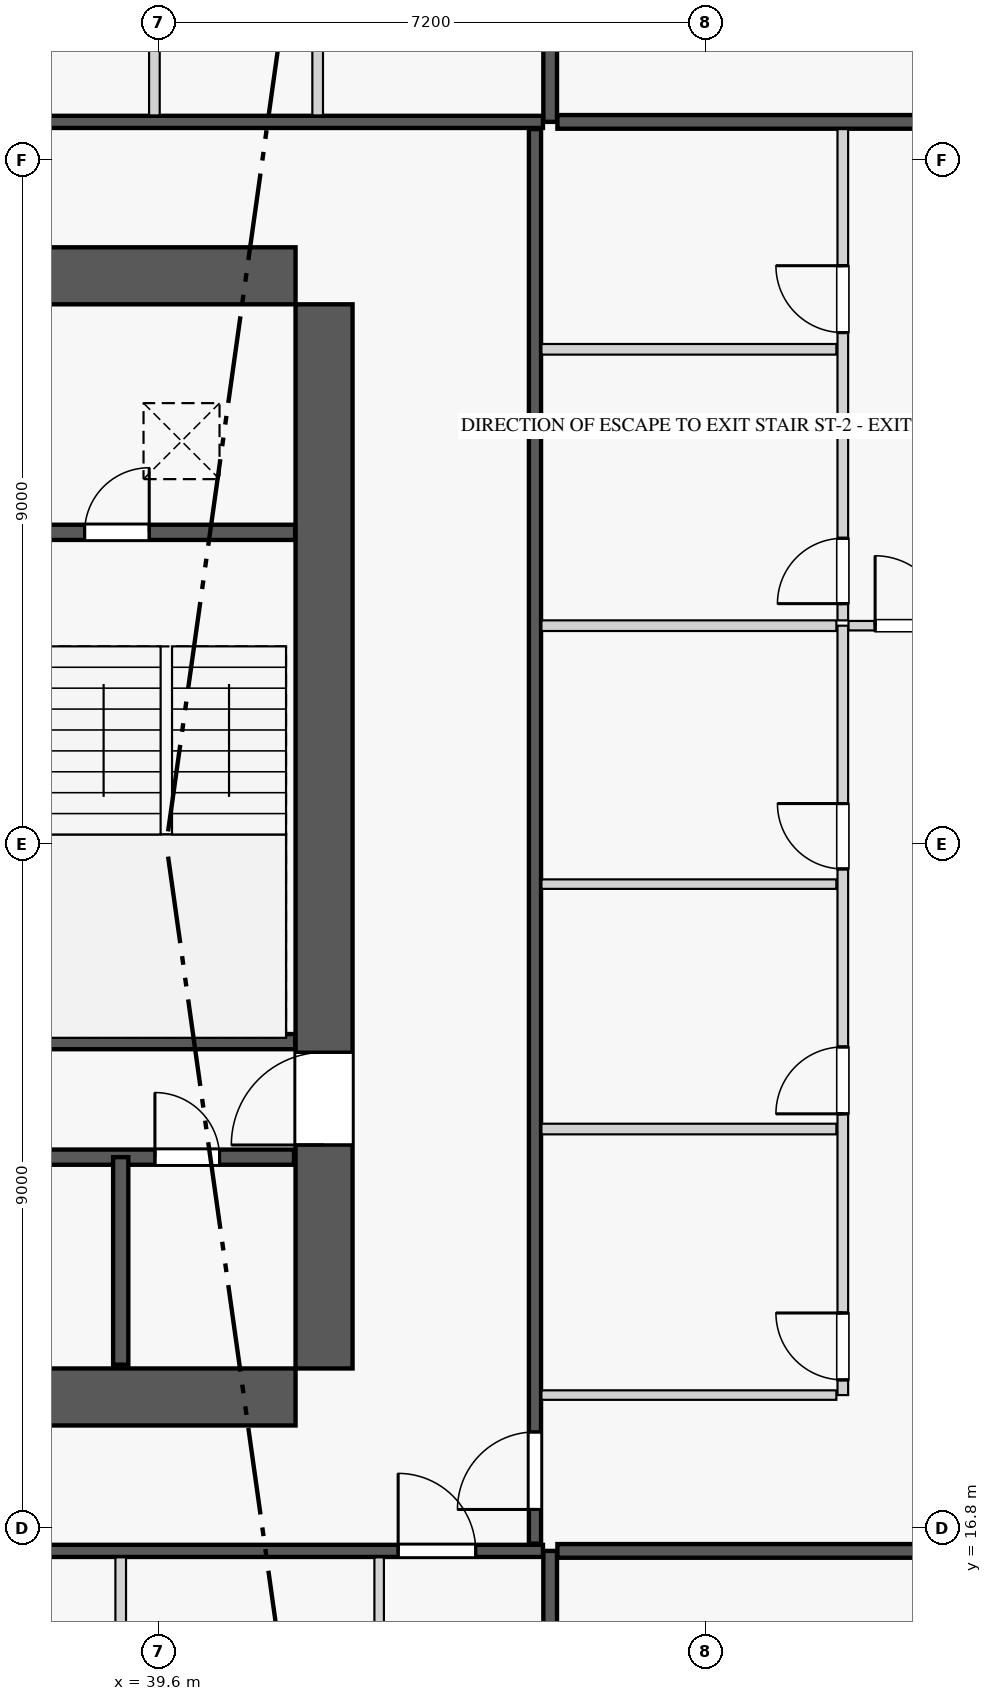
"""IFC4 building model, lengths in metres.
Left out: names, types, materials, properties, quantities, classifications, styles, units other than length and angle.
Written with IfcOpenShell. Run it as: python <this file> out.ifc"""

import sys

from ifc_helpers import new_model, si_unit, direction, frame, frame_2d, origin, origin_2d, place, context, subcontext, project, spatial, rectangle, extrude, element, fill, save


model = new_model("IFC4")
c1 = context("Model", 3, precision=1e-05, world=origin(), true_north=direction((0.0, 1.0)))
c2 = subcontext(c1, "Body", "Model", "MODEL_VIEW")
j1 = project(units=[si_unit("LENGTHUNIT", "METRE"), si_unit("PLANEANGLEUNIT", "RADIAN")], contexts=[c1])
p1 = place(None, origin())
s1 = spatial("IfcSite", under=j1, at=p1, CompositionType="ELEMENT")
p2 = place(p1, origin())
s2 = spatial("IfcBuilding", under=s1, at=p2, CompositionType="ELEMENT")
p3 = place(p2, frame((0.0, 0.0, 112.6)))
s3 = spatial("IfcBuildingStorey", under=s2, at=p3, CompositionType="ELEMENT", Elevation=112.6)
for number, where, z_axis, x_axis in (
    (1, (41.775, 18.525, 0.0), (0.0, 0.0, 1.0), (1.0, 0.0, 0.0)),
    (2, (41.775, 33.275, 0.0), (0.0, 0.0, 1.0), (1.0, 0.0, 0.0)),
):
    element("IfcColumn", number, at=place(p3, frame(where, z_axis=z_axis, x_axis=x_axis)), inside=s3, PredefinedType="COLUMN", context=c2, shape_type="SweptSolid", body=[
        extrude(rectangle(XDim=0.75, YDim=0.75, at=origin_2d()), origin(), (0.0, 0.0, 1.0), 3.55),
    ])
for number, where, z_axis, x_axis in (
    (3, (23.4, 18.525, 0.0), (0.0, 0.0, 1.0), (1.0, 0.0, 0.0)),
    (4, (23.4, 33.275, 0.0), (0.0, 0.0, 1.0), (1.0, 0.0, 0.0)),
):
    element("IfcWall", number, at=place(p3, frame(where, z_axis=z_axis, x_axis=x_axis)), inside=s3, PredefinedType="SHEAR", context=c2, shape_type="SweptSolid", body=[
        extrude(rectangle(XDim=18.0, YDim=0.75, at=frame_2d((9.0, 0.0))), origin(), (0.0, 0.0, 1.0), 3.34),
    ])
p4 = place(p3, frame((41.775, 18.9, 0.0), z_axis=(0.0, 0.0, 1.0), x_axis=(0.0, 1.0, 0.0)))
e5 = element("IfcWall", 5, at=p4, inside=s3, PredefinedType="SHEAR", context=c2, shape_type="SweptSolid", body=[
    extrude(rectangle(XDim=14.0, YDim=0.75, at=frame_2d((7.0, 0.0))), origin(), (0.0, 0.0, 1.0), 3.34),
])
p5 = place(p4, frame((2.94, 0.0, 0.0)))
e6 = element("IfcOpeningElement", 6, at=p5, cuts=e5, PredefinedType="OPENING", context=c2, shape_type="SweptSolid", body=[
    extrude(rectangle(XDim=1.22, YDim=2.25, at=frame_2d((0.61, 1.125))), frame((0.0, 0.385, 0.0), z_axis=(0.0, -1.0, 0.0), x_axis=(1.0, 0.0, 0.0)), (0.0, 0.0, 1.0), 0.77),
])
p6 = place(p3, frame((38.125, 23.2, 0.0), z_axis=(0.0, 0.0, 1.0), x_axis=(1.0, 0.0, 0.0)))
e7 = element("IfcWall", 7, at=p6, inside=s3, PredefinedType="PLUMBINGWALL", context=c2, shape_type="SweptSolid", body=[
    extrude(rectangle(XDim=3.27, YDim=0.2, at=frame_2d((1.635, 0.0))), origin(), (0.0, 0.0, 1.0), 3.34),
])
p7 = place(p3, frame((38.125, 29.9, 0.0), z_axis=(0.0, 0.0, 1.0), x_axis=(1.0, 0.0, 0.0)))
e8 = element("IfcWall", 8, at=p7, inside=s3, PredefinedType="PLUMBINGWALL", context=c2, shape_type="SweptSolid", body=[
    extrude(rectangle(XDim=3.27, YDim=0.2, at=frame_2d((1.635, 0.0))), origin(), (0.0, 0.0, 1.0), 3.34),
])
p8 = place(p7, frame((0.5, 0.0, 0.0)))
e9 = element("IfcOpeningElement", 9, at=p8, cuts=e8, PredefinedType="OPENING", context=c2, shape_type="SweptSolid", body=[
    extrude(rectangle(XDim=0.85, YDim=2.05, at=frame_2d((0.425, 1.025))), frame((0.0, 0.11, 0.0), z_axis=(0.0, -1.0, 0.0), x_axis=(1.0, 0.0, 0.0)), (0.0, 0.0, 1.0), 0.22),
])
p9 = place(p3, frame((23.42, 21.68, 0.0), z_axis=(0.0, 0.0, 1.0), x_axis=(1.0, 0.0, 0.0)))
e10 = element("IfcWall", 10, at=p9, inside=s3, PredefinedType="PLUMBINGWALL", context=c2, shape_type="SweptSolid", body=[
    extrude(rectangle(XDim=17.96, YDim=0.2, at=frame_2d((8.98, 0.0))), origin(), (0.0, 0.0, 1.0), 3.34),
])
p10 = place(p9, frame((11.6, 0.0, 0.0)))
e11 = element("IfcOpeningElement", 11, at=p10, cuts=e10, PredefinedType="OPENING", context=c2, shape_type="SweptSolid", body=[
    extrude(rectangle(XDim=1.1, YDim=2.2, at=frame_2d((0.55, 1.1))), frame((0.0, 0.11, 0.0), z_axis=(0.0, -1.0, 0.0), x_axis=(1.0, 0.0, 0.0)), (0.0, 0.0, 1.0), 0.22),
])
p11 = place(p9, frame((0.41, 0.0, 0.0)))
e12 = element("IfcOpeningElement", 12, at=p11, cuts=e10, PredefinedType="OPENING", context=c2, shape_type="SweptSolid", body=[
    extrude(rectangle(XDim=0.85, YDim=2.05, at=frame_2d((0.425, 1.025))), frame((0.0, 0.11, 0.0), z_axis=(0.0, -1.0, 0.0), x_axis=(1.0, 0.0, 0.0)), (0.0, 0.0, 1.0), 0.22),
])
p12 = place(p9, frame((13.78, 0.0, 0.0)))
e13 = element("IfcOpeningElement", 13, at=p12, cuts=e10, PredefinedType="OPENING", context=c2, shape_type="SweptSolid", body=[
    extrude(rectangle(XDim=0.85, YDim=2.05, at=frame_2d((0.425, 1.025))), frame((0.0, 0.11, 0.0), z_axis=(0.0, -1.0, 0.0), x_axis=(1.0, 0.0, 0.0)), (0.0, 0.0, 1.0), 0.22),
])
p13 = place(p9, frame((16.13, 0.0, 0.0)))
e14 = element("IfcOpeningElement", 14, at=p13, cuts=e10, PredefinedType="OPENING", context=c2, shape_type="SweptSolid", body=[
    extrude(rectangle(XDim=0.85, YDim=2.05, at=frame_2d((0.425, 1.025))), frame((0.0, 0.11, 0.0), z_axis=(0.0, -1.0, 0.0), x_axis=(1.0, 0.0, 0.0)), (0.0, 0.0, 1.0), 0.22),
])
p14 = place(p3, frame((39.1, 18.95, 0.0), z_axis=(0.0, 0.0, 1.0), x_axis=(0.0, 1.0, 0.0)))
e15 = element("IfcWall", 15, at=p14, inside=s3, PredefinedType="PLUMBINGWALL", context=c2, shape_type="SweptSolid", body=[
    extrude(rectangle(XDim=2.73, YDim=0.2, at=frame_2d((1.365, 0.0))), origin(), (0.0, 0.0, 1.0), 3.34),
])
p15 = place(p3, frame((44.75, 4.105, 0.0), z_axis=(0.0, 0.0, 1.0), x_axis=(0.0, 1.0, 0.0)))
e16 = element("IfcWall", 16, at=p15, inside=s3, PredefinedType="PARTITIONING", context=c2, shape_type="SweptSolid", body=[
    extrude(rectangle(XDim=12.395, YDim=0.18, at=frame_2d((6.198, 0.0))), origin(), (0.0, 0.0, 1.0), 3.34),
])
p16 = place(p3, frame((28.663, 16.5, 0.0), z_axis=(0.0, 0.0, 1.0), x_axis=(1.0, 0.0, 0.0)))
e17 = element("IfcWall", 17, at=p16, inside=s3, PredefinedType="PARTITIONING", context=c2, shape_type="SweptSolid", body=[
    extrude(rectangle(XDim=15.992, YDim=0.16, at=frame_2d((7.996, 0.0))), origin(), (0.0, 0.0, 1.0), 3.34),
])
p17 = place(p16, frame((14.087, 0.0, 0.0)))
e18 = element("IfcOpeningElement", 18, at=p17, cuts=e17, PredefinedType="OPENING", context=c2, shape_type="SweptSolid", body=[
    extrude(rectangle(XDim=1.02, YDim=2.25, at=frame_2d((0.51, 1.125))), frame((0.0, 0.09, 0.0), z_axis=(0.0, -1.0, 0.0), x_axis=(1.0, 0.0, 0.0)), (0.0, 0.0, 1.0), 0.18),
])
p18 = place(p3, frame((42.5, 12.391, 0.0), z_axis=(0.0, 0.0, 1.0), x_axis=(0.0, 1.0, 0.0)))
e19 = element("IfcWall", 19, at=p18, inside=s3, PredefinedType="PARTITIONING", context=c2, shape_type="SweptSolid", body=[
    extrude(rectangle(XDim=4.024, YDim=0.125, at=frame_2d((2.012, 0.0))), origin(), (0.0, 0.0, 1.0), 2.722),
])
p19 = place(p3, frame((39.1, 12.391, 0.0), z_axis=(0.0, 0.0, 1.0), x_axis=(0.0, 1.0, 0.0)))
e20 = element("IfcWall", 20, at=p19, inside=s3, PredefinedType="PLUMBINGWALL", context=c2, shape_type="SweptSolid", body=[
    extrude(rectangle(XDim=4.024, YDim=0.14, at=frame_2d((2.012, 0.0))), origin(), (0.0, 0.0, 1.0), 3.34),
])
p20 = place(p3, frame((44.75, 35.3, 0.0), z_axis=(0.0, 0.0, 1.0), x_axis=(0.0, 1.0, 0.0)))
e21 = element("IfcWall", 21, at=p20, inside=s3, PredefinedType="PARTITIONING", context=c2, shape_type="SweptSolid", body=[
    extrude(rectangle(XDim=12.195, YDim=0.18, at=frame_2d((6.098, 0.0))), origin(), (0.0, 0.0, 1.0), 3.34),
])
p21 = place(p3, frame((20.145, 35.3, 0.0), z_axis=(0.0, 0.0, 1.0), x_axis=(1.0, 0.0, 0.0)))
e22 = element("IfcWall", 22, at=p21, inside=s3, PredefinedType="PARTITIONING", context=c2, shape_type="SweptSolid", body=[
    extrude(rectangle(XDim=24.51, YDim=0.16, at=frame_2d((12.255, 0.0))), origin(), (0.0, 0.0, 1.0), 3.34),
])
p22 = place(p21, frame((0.405, 0.0, 0.0)))
e23 = element("IfcOpeningElement", 23, at=p22, cuts=e22, PredefinedType="OPENING", context=c2, shape_type="SweptSolid", body=[
    extrude(rectangle(XDim=1.35, YDim=2.35, at=frame_2d((0.675, 1.175))), frame((0.0, 0.09, 0.0), z_axis=(0.0, -1.0, 0.0), x_axis=(1.0, 0.0, 0.0)), (0.0, 0.0, 1.0), 0.18),
])
p23 = place(p3, frame((39.543, 35.385, 0.0), z_axis=(0.0, 0.0, 1.0), x_axis=(0.0, 1.0, 0.0)))
e24 = element("IfcWall", 24, at=p23, inside=s3, PredefinedType="PLUMBINGWALL", context=c2, shape_type="SweptSolid", body=[
    extrude(rectangle(XDim=6.395, YDim=0.14, at=frame_2d((3.198, 0.0))), origin(), (0.0, 0.0, 1.0), 3.34),
])
p24 = place(p3, frame((41.691, 35.385, 0.0), z_axis=(0.0, 0.0, 1.0), x_axis=(0.0, 1.0, 0.0)))
e25 = element("IfcWall", 25, at=p24, inside=s3, PredefinedType="PLUMBINGWALL", context=c2, shape_type="SweptSolid", body=[
    extrude(rectangle(XDim=6.415, YDim=0.14, at=frame_2d((3.208, 0.0))), origin(), (0.0, 0.0, 1.0), 2.722),
])
p25 = place(p3, frame((44.845, 16.5, 0.0), z_axis=(0.0, 0.0, 1.0), x_axis=(1.0, 0.0, 0.0)))
e26 = element("IfcWall", 26, at=p25, inside=s3, PredefinedType="PARTITIONING", context=c2, shape_type="SweptSolid", body=[
    extrude(rectangle(XDim=7.77, YDim=0.18, at=frame_2d((3.885, 0.0))), origin(), (0.0, 0.0, 1.0), 3.34),
])
p26 = place(p3, frame((44.845, 35.3, 0.0), z_axis=(0.0, 0.0, 1.0), x_axis=(1.0, 0.0, 0.0)))
e27 = element("IfcWall", 27, at=p26, inside=s3, PredefinedType="PARTITIONING", context=c2, shape_type="SweptSolid", body=[
    extrude(rectangle(XDim=7.669, YDim=0.18, at=frame_2d((3.834, 0.0))), origin(), (0.0, 0.0, 1.0), 3.34),
])
p27 = place(p3, frame((44.55, 16.595, 0.0), z_axis=(0.0, 0.0, 1.0), x_axis=(0.0, 1.0, 0.0)))
e28 = element("IfcWall", 28, at=p27, inside=s3, PredefinedType="PARTITIONING", context=c2, shape_type="SweptSolid", body=[
    extrude(rectangle(XDim=18.61, YDim=0.16, at=frame_2d((9.305, 0.0))), origin(), (0.0, 0.0, 1.0), 3.34),
])
p28 = place(p27, frame((0.45, 0.0, 0.0)))
e29 = element("IfcOpeningElement", 29, at=p28, cuts=e28, PredefinedType="OPENING", context=c2, shape_type="SweptSolid", body=[
    extrude(rectangle(XDim=1.02, YDim=2.25, at=frame_2d((0.51, 1.125))), frame((0.0, 0.09, 0.0), z_axis=(0.0, -1.0, 0.0), x_axis=(1.0, 0.0, 0.0)), (0.0, 0.0, 1.0), 0.18),
])
p29 = place(p3, frame((44.635, 18.55, 0.0), z_axis=(0.0, 0.0, 1.0), x_axis=(1.0, 0.0, 0.0)))
e30 = element("IfcWall", 30, at=p29, inside=s3, PredefinedType="PARTITIONING", context=c2, shape_type="SweptSolid", body=[
    extrude(rectangle(XDim=3.88, YDim=0.125, at=frame_2d((1.94, 0.0))), origin(), (0.0, 0.0, 1.0), 2.722),
])
p30 = place(p3, frame((48.6, 18.55, 0.0), z_axis=(0.0, 0.0, 1.0), x_axis=(0.0, 1.0, 0.0)))
e31 = element("IfcWall", 31, at=p30, inside=s3, PredefinedType="PLUMBINGWALL", context=c2, shape_type="SweptSolid", body=[
    extrude(rectangle(XDim=10.122, YDim=0.14, at=frame_2d((5.061, 0.0))), origin(), (0.0, 0.0, 1.0), 3.34),
])
p31 = place(p30, frame((0.2, 0.0, 0.0)))
e32 = element("IfcOpeningElement", 32, at=p31, cuts=e31, PredefinedType="OPENING", context=c2, shape_type="SweptSolid", body=[
    extrude(rectangle(XDim=0.88, YDim=2.15, at=frame_2d((0.44, 1.075))), frame((0.0, 0.08, 0.0), z_axis=(0.0, -1.0, 0.0), x_axis=(1.0, 0.0, 0.0)), (0.0, 0.0, 1.0), 0.16),
])
p32 = place(p30, frame((3.7, 0.0, 0.0)))
e33 = element("IfcOpeningElement", 33, at=p32, cuts=e31, PredefinedType="OPENING", context=c2, shape_type="SweptSolid", body=[
    extrude(rectangle(XDim=0.88, YDim=2.15, at=frame_2d((0.44, 1.075))), frame((0.0, 0.08, 0.0), z_axis=(0.0, -1.0, 0.0), x_axis=(1.0, 0.0, 0.0)), (0.0, 0.0, 1.0), 0.16),
])
p33 = place(p30, frame((6.922, 0.0, 0.0)))
e34 = element("IfcOpeningElement", 34, at=p33, cuts=e31, PredefinedType="OPENING", context=c2, shape_type="SweptSolid", body=[
    extrude(rectangle(XDim=0.86, YDim=2.1, at=frame_2d((0.43, 1.05))), frame((0.0, 0.08, 0.0), z_axis=(0.0, -1.0, 0.0), x_axis=(1.0, 0.0, 0.0)), (0.0, 0.0, 1.0), 0.16),
])
p34 = place(p3, frame((48.6, 28.742, 0.0), z_axis=(0.0, 0.0, 1.0), x_axis=(0.0, 1.0, 0.0)))
e35 = element("IfcWall", 35, at=p34, inside=s3, PredefinedType="PLUMBINGWALL", context=c2, shape_type="SweptSolid", body=[
    extrude(rectangle(XDim=6.463, YDim=0.14, at=frame_2d((3.231, 0.0))), origin(), (0.0, 0.0, 1.0), 3.34),
])
p35 = place(p34, frame((0.22, 0.0, 0.0)))
e36 = element("IfcOpeningElement", 36, at=p35, cuts=e35, PredefinedType="OPENING", context=c2, shape_type="SweptSolid", body=[
    extrude(rectangle(XDim=0.86, YDim=2.1, at=frame_2d((0.43, 1.05))), frame((0.0, 0.08, 0.0), z_axis=(0.0, -1.0, 0.0), x_axis=(1.0, 0.0, 0.0)), (0.0, 0.0, 1.0), 0.16),
])
p36 = place(p34, frame((3.786, 0.0, 0.0)))
e37 = element("IfcOpeningElement", 37, at=p36, cuts=e35, PredefinedType="OPENING", context=c2, shape_type="SweptSolid", body=[
    extrude(rectangle(XDim=0.88, YDim=2.15, at=frame_2d((0.44, 1.075))), frame((0.0, 0.08, 0.0), z_axis=(0.0, -1.0, 0.0), x_axis=(1.0, 0.0, 0.0)), (0.0, 0.0, 1.0), 0.16),
])
p37 = place(p3, frame((44.635, 28.672, 0.0), z_axis=(0.0, 0.0, 1.0), x_axis=(1.0, 0.0, 0.0)))
e38 = element("IfcWall", 38, at=p37, inside=s3, PredefinedType="PLUMBINGWALL", context=c2, shape_type="SweptSolid", body=[
    extrude(rectangle(XDim=3.88, YDim=0.14, at=frame_2d((1.94, 0.0))), origin(), (0.0, 0.0, 1.0), 3.34),
])
p38 = place(p3, frame((48.675, 28.672, 0.0), z_axis=(0.0, 0.0, 1.0), x_axis=(1.0, 0.0, 0.0)))
e39 = element("IfcWall", 39, at=p38, inside=s3, PredefinedType="PARTITIONING", context=c2, shape_type="SweptSolid", body=[
    extrude(rectangle(XDim=7.208, YDim=0.125, at=frame_2d((3.604, 0.0))), origin(), (0.0, 0.0, 1.0), 3.34),
])
p39 = place(p38, frame((0.35, 0.0, 0.0)))
e40 = element("IfcOpeningElement", 40, at=p39, cuts=e39, PredefinedType="OPENING", context=c2, shape_type="SweptSolid", body=[
    extrude(rectangle(XDim=0.92, YDim=2.15, at=frame_2d((0.46, 1.075))), frame((0.0, 0.073, 0.0), z_axis=(0.0, -1.0, 0.0), x_axis=(1.0, 0.0, 0.0)), (0.0, 0.0, 1.0), 0.145),
])
p40 = place(p3, frame((44.635, 22.05, 0.0), z_axis=(0.0, 0.0, 1.0), x_axis=(1.0, 0.0, 0.0)))
e41 = element("IfcWall", 41, at=p40, inside=s3, PredefinedType="PLUMBINGWALL", context=c2, shape_type="SweptSolid", body=[
    extrude(rectangle(XDim=3.88, YDim=0.14, at=frame_2d((1.94, 0.0))), origin(), (0.0, 0.0, 1.0), 3.34),
])
p41 = place(p3, frame((44.635, 25.272, 0.0), z_axis=(0.0, 0.0, 1.0), x_axis=(1.0, 0.0, 0.0)))
e42 = element("IfcWall", 42, at=p41, inside=s3, PredefinedType="PARTITIONING", context=c2, shape_type="SweptSolid", body=[
    extrude(rectangle(XDim=3.88, YDim=0.125, at=frame_2d((1.94, 0.0))), origin(), (0.0, 0.0, 1.0), 3.34),
])
p42 = place(p3, frame((44.635, 32.308, 0.0), z_axis=(0.0, 0.0, 1.0), x_axis=(1.0, 0.0, 0.0)))
e43 = element("IfcWall", 43, at=p42, inside=s3, PredefinedType="PLUMBINGWALL", context=c2, shape_type="SweptSolid", body=[
    extrude(rectangle(XDim=3.88, YDim=0.14, at=frame_2d((1.94, 0.0))), origin(), (0.0, 0.0, 1.0), 3.34),
])
p43 = place(p5, origin())
e44 = element("IfcDoor", 44, at=p43, inside=s3, OperationType="SINGLE_SWING_LEFT", PredefinedType="DOOR", context=c2, shape_type="SweptSolid", body=[
    extrude(rectangle(XDim=1.22, YDim=2.25, at=frame_2d((0.61, 1.125))), frame((0.0, 0.025, 0.0), z_axis=(0.0, -1.0, 0.0), x_axis=(1.0, 0.0, 0.0)), (0.0, 0.0, 1.0), 0.05),
])
fill(e6, e44)
p44 = place(p8, origin())
e45 = element("IfcDoor", 45, at=p44, inside=s3, OperationType="SINGLE_SWING_RIGHT", PredefinedType="DOOR", context=c2, shape_type="SweptSolid", body=[
    extrude(rectangle(XDim=0.85, YDim=2.05, at=frame_2d((0.425, 1.025))), frame((0.0, 0.025, 0.0), z_axis=(0.0, -1.0, 0.0), x_axis=(1.0, 0.0, 0.0)), (0.0, 0.0, 1.0), 0.05),
])
fill(e9, e45)
p45 = place(p13, origin())
e46 = element("IfcDoor", 46, at=p45, inside=s3, OperationType="SINGLE_SWING_LEFT", PredefinedType="DOOR", context=c2, shape_type="SweptSolid", body=[
    extrude(rectangle(XDim=0.85, YDim=2.05, at=frame_2d((0.425, 1.025))), frame((0.0, 0.025, 0.0), z_axis=(0.0, -1.0, 0.0), x_axis=(1.0, 0.0, 0.0)), (0.0, 0.0, 1.0), 0.05),
])
fill(e14, e46)
p46 = place(p17, origin())
e47 = element("IfcDoor", 47, at=p46, inside=s3, OperationType="SINGLE_SWING_LEFT", PredefinedType="DOOR", context=c2, shape_type="SweptSolid", body=[
    extrude(rectangle(XDim=1.02, YDim=2.25, at=frame_2d((0.51, 1.125))), frame((0.0, 0.025, 0.0), z_axis=(0.0, -1.0, 0.0), x_axis=(1.0, 0.0, 0.0)), (0.0, 0.0, 1.0), 0.05),
])
fill(e18, e47)
p47 = place(p31, origin())
e48 = element("IfcDoor", 48, at=p47, inside=s3, OperationType="SINGLE_SWING_RIGHT", PredefinedType="DOOR", context=c2, shape_type="SweptSolid", body=[
    extrude(rectangle(XDim=0.88, YDim=2.15, at=frame_2d((0.44, 1.075))), frame((0.0, 0.025, 0.0), z_axis=(0.0, -1.0, 0.0), x_axis=(1.0, 0.0, 0.0)), (0.0, 0.0, 1.0), 0.05),
])
fill(e32, e48)
p48 = place(p32, origin())
e49 = element("IfcDoor", 49, at=p48, inside=s3, OperationType="SINGLE_SWING_LEFT", PredefinedType="DOOR", context=c2, shape_type="SweptSolid", body=[
    extrude(rectangle(XDim=0.88, YDim=2.15, at=frame_2d((0.44, 1.075))), frame((0.0, 0.025, 0.0), z_axis=(0.0, -1.0, 0.0), x_axis=(1.0, 0.0, 0.0)), (0.0, 0.0, 1.0), 0.05),
])
fill(e33, e49)
p49 = place(p33, origin())
e50 = element("IfcDoor", 50, at=p49, inside=s3, OperationType="SINGLE_SWING_RIGHT", PredefinedType="DOOR", context=c2, shape_type="SweptSolid", body=[
    extrude(rectangle(XDim=0.86, YDim=2.1, at=frame_2d((0.43, 1.05))), frame((0.0, 0.025, 0.0), z_axis=(0.0, -1.0, 0.0), x_axis=(1.0, 0.0, 0.0)), (0.0, 0.0, 1.0), 0.05),
])
fill(e34, e50)
p50 = place(p35, origin())
e51 = element("IfcDoor", 51, at=p50, inside=s3, OperationType="SINGLE_SWING_LEFT", PredefinedType="DOOR", context=c2, shape_type="SweptSolid", body=[
    extrude(rectangle(XDim=0.86, YDim=2.1, at=frame_2d((0.43, 1.05))), frame((0.0, 0.025, 0.0), z_axis=(0.0, -1.0, 0.0), x_axis=(1.0, 0.0, 0.0)), (0.0, 0.0, 1.0), 0.05),
])
fill(e36, e51)
p51 = place(p36, origin())
e52 = element("IfcDoor", 52, at=p51, inside=s3, OperationType="SINGLE_SWING_RIGHT", PredefinedType="DOOR", context=c2, shape_type="SweptSolid", body=[
    extrude(rectangle(XDim=0.88, YDim=2.15, at=frame_2d((0.44, 1.075))), frame((0.0, 0.025, 0.0), z_axis=(0.0, -1.0, 0.0), x_axis=(1.0, 0.0, 0.0)), (0.0, 0.0, 1.0), 0.05),
])
fill(e37, e52)
p52 = place(p28, origin())
e53 = element("IfcDoor", 53, at=p52, inside=s3, OperationType="SINGLE_SWING_LEFT", PredefinedType="DOOR", context=c2, shape_type="SweptSolid", body=[
    extrude(rectangle(XDim=1.02, YDim=2.25, at=frame_2d((0.51, 1.125))), frame((0.0, 0.025, 0.0), z_axis=(0.0, -1.0, 0.0), x_axis=(1.0, 0.0, 0.0)), (0.0, 0.0, 1.0), 0.05),
])
fill(e29, e53)
p53 = place(p39, origin())
e54 = element("IfcDoor", 54, at=p53, inside=s3, OperationType="SINGLE_SWING_LEFT", PredefinedType="DOOR", context=c2, shape_type="SweptSolid", body=[
    extrude(rectangle(XDim=0.92, YDim=2.15, at=frame_2d((0.46, 1.075))), frame((0.0, 0.025, 0.0), z_axis=(0.0, -1.0, 0.0), x_axis=(1.0, 0.0, 0.0)), (0.0, 0.0, 1.0), 0.05),
])
fill(e40, e54)
save(model, sys.argv[1])
